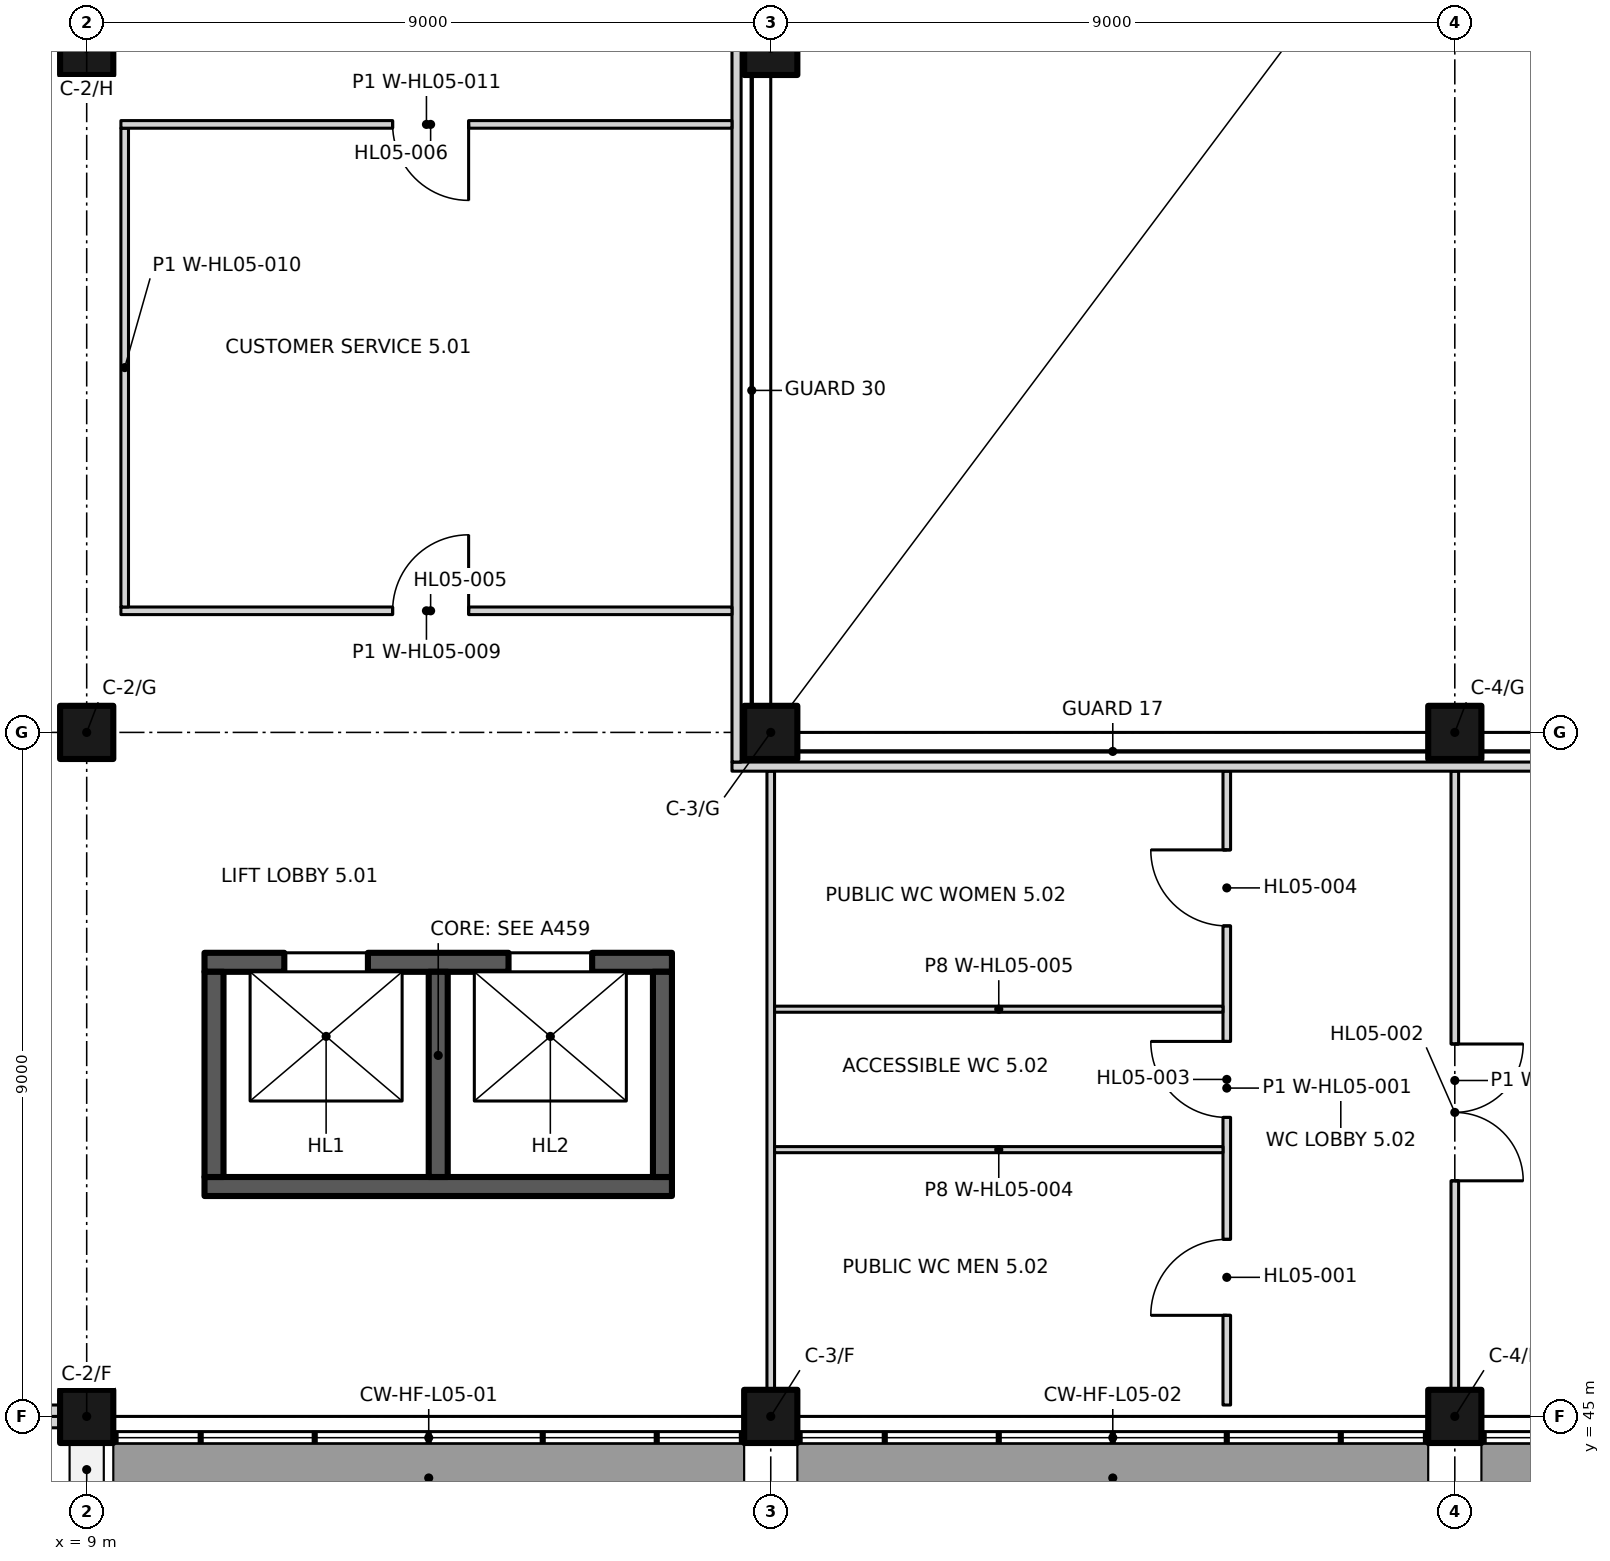
"""IFC4 building model, lengths in metres.
Left out: names, types, materials, properties, quantities, classifications, styles, units other than length and angle.
Written with IfcOpenShell. Run it as: python <this file> out.ifc"""

import sys

from ifc_helpers import new_model, si_unit, direction, frame, frame_2d, origin, origin_2d, place, context, subcontext, project, spatial, rectangle, extrude, element, fill, save


model = new_model("IFC4")
c1 = context("Model", 3, precision=1e-05, world=origin(), true_north=direction((0.0, 1.0)))
c2 = subcontext(c1, "Body", "Model", "MODEL_VIEW")
j1 = project(units=[si_unit("LENGTHUNIT", "METRE"), si_unit("PLANEANGLEUNIT", "RADIAN")], contexts=[c1])
p1 = place(None, origin())
s1 = spatial("IfcSite", under=j1, at=p1, CompositionType="ELEMENT")
p2 = place(p1, origin())
s2 = spatial("IfcBuilding", under=s1, at=p2, CompositionType="ELEMENT")
p3 = place(p2, frame((0.0, 0.0, 24.0)))
s3 = spatial("IfcBuildingStorey", under=s2, at=p3, CompositionType="ELEMENT", Elevation=24.0)
for number, where, z_axis, x_axis in (
    (1, (9.0, 45.0, 0.0), (0.0, 0.0, 1.0), (1.0, 0.0, 0.0)),
    (2, (18.0, 45.0, 0.0), (0.0, 0.0, 1.0), (1.0, 0.0, 0.0)),
    (3, (27.0, 45.0, 0.0), (0.0, 0.0, 1.0), (1.0, 0.0, 0.0)),
    (4, (9.0, 54.0, 0.0), (0.0, 0.0, 1.0), (1.0, 0.0, 0.0)),
    (5, (18.0, 54.0, 0.0), (0.0, 0.0, 1.0), (1.0, 0.0, 0.0)),
    (6, (27.0, 54.0, 0.0), (0.0, 0.0, 1.0), (1.0, 0.0, 0.0)),
    (7, (9.0, 63.0, 0.0), (0.0, 0.0, 1.0), (1.0, 0.0, 0.0)),
    (8, (18.0, 63.0, 0.0), (0.0, 0.0, 1.0), (1.0, 0.0, 0.0)),
):
    element("IfcColumn", number, at=place(p3, frame(where, z_axis=z_axis, x_axis=x_axis)), inside=s3, PredefinedType="COLUMN", context=c2, shape_type="SweptSolid", body=[
        extrude(rectangle(XDim=0.7, YDim=0.7, at=origin_2d()), origin(), (0.0, 0.0, 1.0), 4.5),
    ])
p4 = place(p3, frame((10.55, 50.975, 0.0), z_axis=(0.0, 0.0, 1.0), x_axis=(1.0, 0.0, 0.0)))
e9 = element("IfcWall", 9, at=p4, inside=s3, PredefinedType="SHEAR", context=c2, shape_type="SweptSolid", body=[
    extrude(rectangle(XDim=6.15, YDim=0.25, at=frame_2d((3.075, 0.0))), origin(), (0.0, 0.0, 1.0), 4.5),
])
p5 = place(p4, frame((1.05, 0.0, 0.0)))
e10 = element("IfcOpeningElement", 10, at=p5, cuts=e9, PredefinedType="OPENING", context=c2, shape_type="SweptSolid", body=[
    extrude(rectangle(XDim=1.1, YDim=2.1, at=frame_2d((0.55, 1.05))), frame((0.0, 0.135, 0.0), z_axis=(0.0, -1.0, 0.0), x_axis=(1.0, 0.0, 0.0)), (0.0, 0.0, 1.0), 0.27),
])
p6 = place(p4, frame((4.0, 0.0, 0.0)))
e11 = element("IfcOpeningElement", 11, at=p6, cuts=e9, PredefinedType="OPENING", context=c2, shape_type="SweptSolid", body=[
    extrude(rectangle(XDim=1.1, YDim=2.1, at=frame_2d((0.55, 1.05))), frame((0.0, 0.135, 0.0), z_axis=(0.0, -1.0, 0.0), x_axis=(1.0, 0.0, 0.0)), (0.0, 0.0, 1.0), 0.27),
])
p7 = place(p3, frame((10.55, 48.025, 0.0), z_axis=(0.0, 0.0, 1.0), x_axis=(1.0, 0.0, 0.0)))
e12 = element("IfcWall", 12, at=p7, inside=s3, PredefinedType="SHEAR", context=c2, shape_type="SweptSolid", body=[
    extrude(rectangle(XDim=6.15, YDim=0.25, at=frame_2d((3.075, 0.0))), origin(), (0.0, 0.0, 1.0), 4.5),
])
for number, where, z_axis, x_axis in (
    (13, (10.675, 48.15, 0.0), (0.0, 0.0, 1.0), (0.0, 1.0, 0.0)),
    (14, (13.625, 48.15, 0.0), (0.0, 0.0, 1.0), (0.0, 1.0, 0.0)),
    (15, (16.575, 48.15, 0.0), (0.0, 0.0, 1.0), (0.0, 1.0, 0.0)),
):
    element("IfcWall", number, at=place(p3, frame(where, z_axis=z_axis, x_axis=x_axis)), inside=s3, PredefinedType="SHEAR", context=c2, shape_type="SweptSolid", body=[
        extrude(rectangle(XDim=2.7, YDim=0.25, at=frame_2d((1.35, 0.0))), origin(), (0.0, 0.0, 1.0), 4.5),
    ])
p8 = place(p3, frame((8.65, 45.0, 0.0), z_axis=(0.0, 0.0, 1.0), x_axis=(-1.0, 0.0, 0.0)))
e16 = element("IfcWall", 16, at=p8, inside=s3, PredefinedType="SOLIDWALL", context=c2, shape_type="SweptSolid", body=[
    extrude(rectangle(XDim=4.15, YDim=0.3, at=frame_2d((2.075, 0.0))), origin(), (0.0, 0.0, 1.0), 3.7),
])
p9 = place(p8, frame((1.45, 0.0, 0.45)))
e17 = element("IfcOpeningElement", 17, at=p9, cuts=e16, PredefinedType="OPENING", context=c2, shape_type="SweptSolid", body=[
    extrude(rectangle(XDim=0.9, YDim=3.0, at=frame_2d((0.45, 1.5))), frame((0.0, 0.16, 0.0), z_axis=(0.0, -1.0, 0.0), x_axis=(1.0, 0.0, 0.0)), (0.0, 0.0, 1.0), 0.32),
])
p10 = place(p3, frame((24.0, 45.15, 0.0), z_axis=(0.0, 0.0, 1.0), x_axis=(0.0, 1.0, 0.0)))
e18 = element("IfcWall", 18, at=p10, inside=s3, PredefinedType="PARTITIONING", context=c2, shape_type="SweptSolid", body=[
    extrude(rectangle(XDim=8.34, YDim=0.1, at=frame_2d((4.17, 0.0))), origin(), (0.0, 0.0, 1.0), 3.7),
])
p11 = place(p10, frame((1.18, 0.0, 0.0)))
e19 = element("IfcOpeningElement", 19, at=p11, cuts=e18, PredefinedType="OPENING", context=c2, shape_type="SweptSolid", body=[
    extrude(rectangle(XDim=1.0, YDim=2.1, at=frame_2d((0.5, 1.05))), frame((0.0, 0.06, 0.0), z_axis=(0.0, -1.0, 0.0), x_axis=(1.0, 0.0, 0.0)), (0.0, 0.0, 1.0), 0.12),
])
p12 = place(p10, frame((3.784, 0.0, 0.0)))
e20 = element("IfcOpeningElement", 20, at=p12, cuts=e18, PredefinedType="OPENING", context=c2, shape_type="SweptSolid", body=[
    extrude(rectangle(XDim=1.0, YDim=2.1, at=frame_2d((0.5, 1.05))), frame((0.0, 0.06, 0.0), z_axis=(0.0, -1.0, 0.0), x_axis=(1.0, 0.0, 0.0)), (0.0, 0.0, 1.0), 0.12),
])
p13 = place(p10, frame((6.304, 0.0, 0.0)))
e21 = element("IfcOpeningElement", 21, at=p13, cuts=e18, PredefinedType="OPENING", context=c2, shape_type="SweptSolid", body=[
    extrude(rectangle(XDim=1.0, YDim=2.1, at=frame_2d((0.5, 1.05))), frame((0.0, 0.06, 0.0), z_axis=(0.0, -1.0, 0.0), x_axis=(1.0, 0.0, 0.0)), (0.0, 0.0, 1.0), 0.12),
])
p14 = place(p3, frame((18.0, 45.35, 0.0), z_axis=(0.0, 0.0, 1.0), x_axis=(0.0, 1.0, 0.0)))
e22 = element("IfcWall", 22, at=p14, inside=s3, PredefinedType="PARTITIONING", context=c2, shape_type="SweptSolid", body=[
    extrude(rectangle(XDim=8.14, YDim=0.1, at=frame_2d((4.07, 0.0))), origin(), (0.0, 0.0, 1.0), 3.7),
])
p15 = place(p3, frame((27.0, 45.35, 0.0), z_axis=(0.0, 0.0, 1.0), x_axis=(0.0, 1.0, 0.0)))
e23 = element("IfcWall", 23, at=p15, inside=s3, PredefinedType="PARTITIONING", context=c2, shape_type="SweptSolid", body=[
    extrude(rectangle(XDim=8.14, YDim=0.1, at=frame_2d((4.07, 0.0))), origin(), (0.0, 0.0, 1.0), 4.2),
])
p16 = place(p15, frame((4.55, 0.0, 0.0), z_axis=(0.0, 0.0, 1.0), x_axis=(-1.0, 0.0, 0.0)))
e24 = element("IfcOpeningElement", 24, at=p16, cuts=e23, PredefinedType="OPENING", context=c2, shape_type="SweptSolid", body=[
    extrude(rectangle(XDim=1.8, YDim=2.1, at=frame_2d((0.9, 1.05))), frame((0.0, 0.06, 0.0), z_axis=(0.0, -1.0, 0.0), x_axis=(1.0, 0.0, 0.0)), (0.0, 0.0, 1.0), 0.12),
])
for number, where, z_axis, x_axis in (
    (25, (18.05, 48.51, 0.0), (0.0, 0.0, 1.0), (1.0, 0.0, 0.0)),
    (26, (18.05, 50.358, 0.0), (0.0, 0.0, 1.0), (1.0, 0.0, 0.0)),
):
    element("IfcWall", number, at=place(p3, frame(where, z_axis=z_axis, x_axis=x_axis)), inside=s3, PredefinedType="PARTITIONING", context=c2, shape_type="SweptSolid", body=[
        extrude(rectangle(XDim=5.9, YDim=0.08, at=frame_2d((2.95, 0.0))), origin(), (0.0, 0.0, 1.0), 3.7),
    ])
p17 = place(p3, frame((17.49, 53.55, 0.0), z_axis=(0.0, 0.0, 1.0), x_axis=(1.0, 0.0, 0.0)))
e27 = element("IfcWall", 27, at=p17, inside=s3, PredefinedType="PARTITIONING", context=c2, shape_type="SweptSolid", body=[
    extrude(rectangle(XDim=28.02, YDim=0.12, at=frame_2d((14.01, 0.0))), origin(), (0.0, 0.0, 1.0), 3.7),
])
p18 = place(p3, frame((17.55, 53.61, 0.0), z_axis=(0.0, 0.0, 1.0), x_axis=(0.0, 1.0, 0.0)))
e28 = element("IfcWall", 28, at=p18, inside=s3, PredefinedType="PARTITIONING", context=c2, shape_type="SweptSolid", body=[
    extrude(rectangle(XDim=36.515, YDim=0.12, at=frame_2d((18.257, 0.0))), origin(), (0.0, 0.0, 1.0), 3.7),
])
p19 = place(p3, frame((9.45, 55.6, 0.0), z_axis=(0.0, 0.0, 1.0), x_axis=(1.0, 0.0, 0.0)))
e29 = element("IfcWall", 29, at=p19, inside=s3, PredefinedType="PARTITIONING", context=c2, shape_type="SweptSolid", body=[
    extrude(rectangle(XDim=8.04, YDim=0.1, at=frame_2d((4.02, 0.0))), origin(), (0.0, 0.0, 1.0), 4.2),
])
p20 = place(p19, frame((3.575, 0.0, 0.0)))
e30 = element("IfcOpeningElement", 30, at=p20, cuts=e29, PredefinedType="OPENING", context=c2, shape_type="SweptSolid", body=[
    extrude(rectangle(XDim=1.0, YDim=2.1, at=frame_2d((0.5, 1.05))), frame((0.0, 0.06, 0.0), z_axis=(0.0, -1.0, 0.0), x_axis=(1.0, 0.0, 0.0)), (0.0, 0.0, 1.0), 0.12),
])
p21 = place(p3, frame((9.5, 55.65, 0.0), z_axis=(0.0, 0.0, 1.0), x_axis=(0.0, 1.0, 0.0)))
e31 = element("IfcWall", 31, at=p21, inside=s3, PredefinedType="PARTITIONING", context=c2, shape_type="SweptSolid", body=[
    extrude(rectangle(XDim=6.3, YDim=0.1, at=frame_2d((3.15, 0.0))), origin(), (0.0, 0.0, 1.0), 4.2),
])
p22 = place(p3, frame((9.45, 62.0, 0.0), z_axis=(0.0, 0.0, 1.0), x_axis=(1.0, 0.0, 0.0)))
e32 = element("IfcWall", 32, at=p22, inside=s3, PredefinedType="PARTITIONING", context=c2, shape_type="SweptSolid", body=[
    extrude(rectangle(XDim=8.04, YDim=0.1, at=frame_2d((4.02, 0.0))), origin(), (0.0, 0.0, 1.0), 4.2),
])
p23 = place(p22, frame((4.575, 0.0, 0.0), z_axis=(0.0, 0.0, 1.0), x_axis=(-1.0, 0.0, 0.0)))
e33 = element("IfcOpeningElement", 33, at=p23, cuts=e32, PredefinedType="OPENING", context=c2, shape_type="SweptSolid", body=[
    extrude(rectangle(XDim=1.0, YDim=2.1, at=frame_2d((0.5, 1.05))), frame((0.0, 0.06, 0.0), z_axis=(0.0, -1.0, 0.0), x_axis=(1.0, 0.0, 0.0)), (0.0, 0.0, 1.0), 0.12),
])
p24 = place(p5, origin())
e34 = element("IfcDoor", 34, at=p24, inside=s3, OperationType="DOUBLE_DOOR_SLIDING", PredefinedType="DOOR", context=c2, shape_type="SweptSolid", body=[
    extrude(rectangle(XDim=1.1, YDim=2.1, at=frame_2d((0.55, 1.05))), frame((0.0, 0.025, 0.0), z_axis=(0.0, -1.0, 0.0), x_axis=(1.0, 0.0, 0.0)), (0.0, 0.0, 1.0), 0.05),
])
fill(e10, e34)
p25 = place(p6, origin())
e35 = element("IfcDoor", 35, at=p25, inside=s3, OperationType="DOUBLE_DOOR_SLIDING", PredefinedType="DOOR", context=c2, shape_type="SweptSolid", body=[
    extrude(rectangle(XDim=1.1, YDim=2.1, at=frame_2d((0.55, 1.05))), frame((0.0, 0.025, 0.0), z_axis=(0.0, -1.0, 0.0), x_axis=(1.0, 0.0, 0.0)), (0.0, 0.0, 1.0), 0.05),
])
fill(e11, e35)
p26 = place(p11, origin())
e36 = element("IfcDoor", 36, at=p26, inside=s3, OperationType="SINGLE_SWING_LEFT", PredefinedType="DOOR", context=c2, shape_type="SweptSolid", body=[
    extrude(rectangle(XDim=1.0, YDim=2.1, at=frame_2d((0.5, 1.05))), frame((0.0, 0.025, 0.0), z_axis=(0.0, -1.0, 0.0), x_axis=(1.0, 0.0, 0.0)), (0.0, 0.0, 1.0), 0.05),
])
fill(e19, e36)
p27 = place(p16, origin())
e37 = element("IfcDoor", 37, at=p27, inside=s3, OperationType="DOUBLE_DOOR_SINGLE_SWING", PredefinedType="DOOR", context=c2, shape_type="SweptSolid", body=[
    extrude(rectangle(XDim=1.8, YDim=2.1, at=frame_2d((0.9, 1.05))), frame((0.0, 0.025, 0.0), z_axis=(0.0, -1.0, 0.0), x_axis=(1.0, 0.0, 0.0)), (0.0, 0.0, 1.0), 0.05),
])
fill(e24, e37)
p28 = place(p12, origin())
e38 = element("IfcDoor", 38, at=p28, inside=s3, OperationType="SINGLE_SWING_RIGHT", PredefinedType="DOOR", context=c2, shape_type="SweptSolid", body=[
    extrude(rectangle(XDim=1.0, YDim=2.1, at=frame_2d((0.5, 1.05))), frame((0.0, 0.025, 0.0), z_axis=(0.0, -1.0, 0.0), x_axis=(1.0, 0.0, 0.0)), (0.0, 0.0, 1.0), 0.05),
])
fill(e20, e38)
p29 = place(p13, origin())
e39 = element("IfcDoor", 39, at=p29, inside=s3, OperationType="SINGLE_SWING_RIGHT", PredefinedType="DOOR", context=c2, shape_type="SweptSolid", body=[
    extrude(rectangle(XDim=1.0, YDim=2.1, at=frame_2d((0.5, 1.05))), frame((0.0, 0.025, 0.0), z_axis=(0.0, -1.0, 0.0), x_axis=(1.0, 0.0, 0.0)), (0.0, 0.0, 1.0), 0.05),
])
fill(e21, e39)
p30 = place(p20, origin())
e40 = element("IfcDoor", 40, at=p30, inside=s3, OperationType="SINGLE_SWING_RIGHT", PredefinedType="DOOR", context=c2, shape_type="SweptSolid", body=[
    extrude(rectangle(XDim=1.0, YDim=2.1, at=frame_2d((0.5, 1.05))), frame((0.0, 0.025, 0.0), z_axis=(0.0, -1.0, 0.0), x_axis=(1.0, 0.0, 0.0)), (0.0, 0.0, 1.0), 0.05),
])
fill(e30, e40)
p31 = place(p23, origin())
e41 = element("IfcDoor", 41, at=p31, inside=s3, OperationType="SINGLE_SWING_LEFT", PredefinedType="DOOR", context=c2, shape_type="SweptSolid", body=[
    extrude(rectangle(XDim=1.0, YDim=2.1, at=frame_2d((0.5, 1.05))), frame((0.0, 0.025, 0.0), z_axis=(0.0, -1.0, 0.0), x_axis=(1.0, 0.0, 0.0)), (0.0, 0.0, 1.0), 0.05),
])
fill(e33, e41)
save(model, sys.argv[1])
